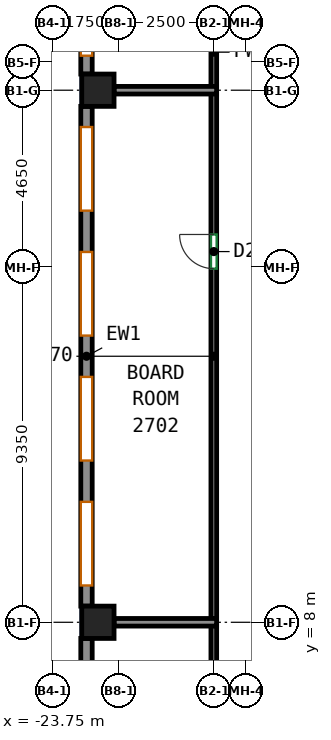
"""IFC4 building model, lengths in metres.
Left out: names, types, materials, properties, quantities, classifications, styles, units other than length and angle.
Written with IfcOpenShell. Run it as: python <this file> out.ifc"""

import sys

from ifc_helpers import new_model, si_unit, direction, frame, frame_2d, origin, origin_2d, place, context, subcontext, project, spatial, rectangle, extrude, source, transform, mapped, element, fill, save


model = new_model("IFC4")
c1 = context("Model", 3, precision=1e-05, world=origin(), true_north=direction((0.0, 1.0)))
c2 = subcontext(c1, "Body", "Model", "MODEL_VIEW")
j1 = project(units=[si_unit("LENGTHUNIT", "METRE"), si_unit("PLANEANGLEUNIT", "RADIAN")], contexts=[c1])
p1 = place(None, origin())
s1 = spatial("IfcSite", under=j1, at=p1, CompositionType="ELEMENT")
p2 = place(p1, origin())
s2 = spatial("IfcBuilding", under=s1, at=p2, CompositionType="ELEMENT")
p3 = place(p2, frame((0.0, 0.0, 116.6)))
s3 = spatial("IfcBuildingStorey", under=s2, at=p3, CompositionType="ELEMENT", Elevation=116.6)
m1 = source(origin(), c2, "Body", "SweptSolid", [
    extrude(rectangle(XDim=0.85, YDim=0.85, at=origin_2d()), origin(), (0.0, 0.0, 1.0), 3.72),
])
for number, where, z_axis, x_axis in (
    (1, (-22.55, 8.0, 0.0), (0.0, 0.0, 1.0), (1.0, 0.0, 0.0)),
    (2, (-22.55, 22.0, 0.0), (0.0, 0.0, 1.0), (1.0, 0.0, 0.0)),
):
    element("IfcColumn", number, at=place(p3, frame(where, z_axis=z_axis, x_axis=x_axis)), inside=s3, PredefinedType="COLUMN", context=c2, shape_type="MappedRepresentation", body=[
        mapped(m1, transform((0.0, 0.0, 0.0))),
    ])
m2 = source(origin(), c2, "Body", "SweptSolid", [
    extrude(rectangle(XDim=6.332, YDim=0.3, at=frame_2d((3.166, 0.0))), origin(), (0.0, 0.0, 1.0), 3.72),
])
p4 = place(p3, frame((-22.85, 28.757, 0.0), z_axis=(0.0, 0.0, 1.0), x_axis=(0.0, -1.0, 0.0)))
e3 = element("IfcWall", 3, at=p4, inside=s3, PredefinedType="SOLIDWALL", context=c2, shape_type="MappedRepresentation", body=[
    mapped(m2, transform((0.0, 0.0, 0.0))),
])
p5 = place(p4, frame((0.483, 0.0, 0.7)))
e4 = element("IfcOpeningElement", 4, at=p5, cuts=e3, PredefinedType="OPENING", context=c2, shape_type="SweptSolid", body=[
    extrude(rectangle(XDim=2.2, YDim=2.25, at=frame_2d((1.1, 1.125))), frame((0.0, 0.16, 0.0), z_axis=(0.0, -1.0, 0.0), x_axis=(1.0, 0.0, 0.0)), (0.0, 0.0, 1.0), 0.32),
])
p6 = place(p4, frame((3.649, 0.0, 0.7)))
e5 = element("IfcOpeningElement", 5, at=p6, cuts=e3, PredefinedType="OPENING", context=c2, shape_type="SweptSolid", body=[
    extrude(rectangle(XDim=2.2, YDim=2.25, at=frame_2d((1.1, 1.125))), frame((0.0, 0.16, 0.0), z_axis=(0.0, -1.0, 0.0), x_axis=(1.0, 0.0, 0.0)), (0.0, 0.0, 1.0), 0.32),
])
m3 = source(origin(), c2, "Body", "SweptSolid", [
    extrude(rectangle(XDim=13.15, YDim=0.3, at=frame_2d((6.575, 0.0))), origin(), (0.0, 0.0, 1.0), 3.72),
])
p7 = place(p3, frame((-22.85, 21.575, 0.0), z_axis=(0.0, 0.0, 1.0), x_axis=(0.0, -1.0, 0.0)))
e6 = element("IfcWall", 6, at=p7, inside=s3, PredefinedType="SOLIDWALL", context=c2, shape_type="MappedRepresentation", body=[
    mapped(m3, transform((0.0, 0.0, 0.0))),
])
p8 = place(p7, frame((0.544, 0.0, 0.7)))
e7 = element("IfcOpeningElement", 7, at=p8, cuts=e6, PredefinedType="OPENING", context=c2, shape_type="SweptSolid", body=[
    extrude(rectangle(XDim=2.2, YDim=2.25, at=frame_2d((1.1, 1.125))), frame((0.0, 0.16, 0.0), z_axis=(0.0, -1.0, 0.0), x_axis=(1.0, 0.0, 0.0)), (0.0, 0.0, 1.0), 0.32),
])
p9 = place(p7, frame((3.831, 0.0, 0.7)))
e8 = element("IfcOpeningElement", 8, at=p9, cuts=e6, PredefinedType="OPENING", context=c2, shape_type="SweptSolid", body=[
    extrude(rectangle(XDim=2.2, YDim=2.25, at=frame_2d((1.1, 1.125))), frame((0.0, 0.16, 0.0), z_axis=(0.0, -1.0, 0.0), x_axis=(1.0, 0.0, 0.0)), (0.0, 0.0, 1.0), 0.32),
])
p10 = place(p7, frame((7.119, 0.0, 0.7)))
e9 = element("IfcOpeningElement", 9, at=p10, cuts=e6, PredefinedType="OPENING", context=c2, shape_type="SweptSolid", body=[
    extrude(rectangle(XDim=2.2, YDim=2.25, at=frame_2d((1.1, 1.125))), frame((0.0, 0.16, 0.0), z_axis=(0.0, -1.0, 0.0), x_axis=(1.0, 0.0, 0.0)), (0.0, 0.0, 1.0), 0.32),
])
p11 = place(p7, frame((10.406, 0.0, 0.7)))
e10 = element("IfcOpeningElement", 10, at=p11, cuts=e6, PredefinedType="OPENING", context=c2, shape_type="SweptSolid", body=[
    extrude(rectangle(XDim=2.2, YDim=2.25, at=frame_2d((1.1, 1.125))), frame((0.0, 0.16, 0.0), z_axis=(0.0, -1.0, 0.0), x_axis=(1.0, 0.0, 0.0)), (0.0, 0.0, 1.0), 0.32),
])
m4 = source(origin(), c2, "Body", "SweptSolid", [
    extrude(rectangle(XDim=6.9, YDim=0.3, at=frame_2d((3.45, 0.0))), origin(), (0.0, 0.0, 1.0), 3.72),
])
p12 = place(p3, frame((-22.85, 7.575, 0.0), z_axis=(0.0, 0.0, 1.0), x_axis=(0.0, -1.0, 0.0)))
e11 = element("IfcWall", 11, at=p12, inside=s3, PredefinedType="SOLIDWALL", context=c2, shape_type="MappedRepresentation", body=[
    mapped(m4, transform((0.0, 0.0, 0.0))),
])
p13 = place(p12, frame((0.625, 0.0, 0.7)))
e12 = element("IfcOpeningElement", 12, at=p13, cuts=e11, PredefinedType="OPENING", context=c2, shape_type="SweptSolid", body=[
    extrude(rectangle(XDim=2.2, YDim=2.25, at=frame_2d((1.1, 1.125))), frame((0.0, 0.16, 0.0), z_axis=(0.0, -1.0, 0.0), x_axis=(1.0, 0.0, 0.0)), (0.0, 0.0, 1.0), 0.32),
])
p14 = place(p12, frame((4.075, 0.0, 0.7)))
e13 = element("IfcOpeningElement", 13, at=p14, cuts=e11, PredefinedType="OPENING", context=c2, shape_type="SweptSolid", body=[
    extrude(rectangle(XDim=2.2, YDim=2.25, at=frame_2d((1.1, 1.125))), frame((0.0, 0.16, 0.0), z_axis=(0.0, -1.0, 0.0), x_axis=(1.0, 0.0, 0.0)), (0.0, 0.0, 1.0), 0.32),
])
p15 = place(p3, frame((-19.5, 4.35, 0.0), z_axis=(0.0, 0.0, 1.0), x_axis=(0.0, 1.0, 0.0)))
e14 = element("IfcWall", 14, at=p15, inside=s3, PredefinedType="PARTITIONING", context=c2, shape_type="SweptSolid", body=[
    extrude(rectangle(XDim=3.56, YDim=0.15, at=frame_2d((1.78, 0.0))), origin(), (0.0, 0.0, 1.0), 3.07),
])
p16 = place(p3, frame((-19.5, 22.09, 0.0), z_axis=(0.0, 0.0, 1.0), x_axis=(0.0, 1.0, 0.0)))
e15 = element("IfcWall", 15, at=p16, inside=s3, PredefinedType="PARTITIONING", context=c2, shape_type="SweptSolid", body=[
    extrude(rectangle(XDim=3.035, YDim=0.15, at=frame_2d((1.518, 0.0))), origin(), (0.0, 0.0, 1.0), 3.07),
])
p17 = place(p16, frame((1.631, 0.0, 0.0)))
e16 = element("IfcOpeningElement", 16, at=p17, cuts=e15, PredefinedType="OPENING", context=c2, shape_type="SweptSolid", body=[
    extrude(rectangle(XDim=1.0, YDim=2.1, at=frame_2d((0.5, 1.05))), frame((0.0, 0.085, 0.0), z_axis=(0.0, -1.0, 0.0), x_axis=(1.0, 0.0, 0.0)), (0.0, 0.0, 1.0), 0.17),
])
p18 = place(p3, frame((-19.5, 8.09, 0.0), z_axis=(0.0, 0.0, 1.0), x_axis=(0.0, 1.0, 0.0)))
e17 = element("IfcWall", 17, at=p18, inside=s3, PredefinedType="PARTITIONING", context=c2, shape_type="SweptSolid", body=[
    extrude(rectangle(XDim=13.82, YDim=0.15, at=frame_2d((6.91, 0.0))), origin(), (0.0, 0.0, 1.0), 3.07),
])
p19 = place(p18, frame((9.214, 0.0, 0.0)))
e18 = element("IfcOpeningElement", 18, at=p19, cuts=e17, PredefinedType="OPENING", context=c2, shape_type="SweptSolid", body=[
    extrude(rectangle(XDim=0.9, YDim=2.1, at=frame_2d((0.45, 1.05))), frame((0.0, 0.085, 0.0), z_axis=(0.0, -1.0, 0.0), x_axis=(1.0, 0.0, 0.0)), (0.0, 0.0, 1.0), 0.17),
])
for number, where, z_axis, x_axis in (
    (19, (-22.125, 8.0, 0.0), (0.0, 0.0, 1.0), (1.0, 0.0, 0.0)),
    (20, (-22.125, 22.0, 0.0), (0.0, 0.0, 1.0), (1.0, 0.0, 0.0)),
):
    element("IfcWall", number, at=place(p3, frame(where, z_axis=z_axis, x_axis=x_axis)), inside=s3, PredefinedType="PARTITIONING", context=c2, shape_type="SweptSolid", body=[
        extrude(rectangle(XDim=2.699, YDim=0.2, at=frame_2d((1.35, 0.0))), origin(), (0.0, 0.0, 1.0), 3.72),
    ])
p20 = place(p6, origin())
e21 = element("IfcWindow", 21, at=p20, inside=s3, PartitioningType="SINGLE_PANEL", PredefinedType="WINDOW", context=c2, shape_type="SweptSolid", body=[
    extrude(rectangle(XDim=2.2, YDim=2.25, at=frame_2d((1.1, 1.125))), frame((0.0, 0.03, 0.0), z_axis=(0.0, -1.0, 0.0), x_axis=(1.0, 0.0, 0.0)), (0.0, 0.0, 1.0), 0.06),
])
fill(e5, e21)
p21 = place(p8, origin())
e22 = element("IfcWindow", 22, at=p21, inside=s3, PartitioningType="SINGLE_PANEL", PredefinedType="WINDOW", context=c2, shape_type="SweptSolid", body=[
    extrude(rectangle(XDim=2.2, YDim=2.25, at=frame_2d((1.1, 1.125))), frame((0.0, 0.03, 0.0), z_axis=(0.0, -1.0, 0.0), x_axis=(1.0, 0.0, 0.0)), (0.0, 0.0, 1.0), 0.06),
])
fill(e7, e22)
p22 = place(p9, origin())
e23 = element("IfcWindow", 23, at=p22, inside=s3, PartitioningType="SINGLE_PANEL", PredefinedType="WINDOW", context=c2, shape_type="SweptSolid", body=[
    extrude(rectangle(XDim=2.2, YDim=2.25, at=frame_2d((1.1, 1.125))), frame((0.0, 0.03, 0.0), z_axis=(0.0, -1.0, 0.0), x_axis=(1.0, 0.0, 0.0)), (0.0, 0.0, 1.0), 0.06),
])
fill(e8, e23)
p23 = place(p10, origin())
e24 = element("IfcWindow", 24, at=p23, inside=s3, PartitioningType="SINGLE_PANEL", PredefinedType="WINDOW", context=c2, shape_type="SweptSolid", body=[
    extrude(rectangle(XDim=2.2, YDim=2.25, at=frame_2d((1.1, 1.125))), frame((0.0, 0.03, 0.0), z_axis=(0.0, -1.0, 0.0), x_axis=(1.0, 0.0, 0.0)), (0.0, 0.0, 1.0), 0.06),
])
fill(e9, e24)
p24 = place(p11, origin())
e25 = element("IfcWindow", 25, at=p24, inside=s3, PartitioningType="SINGLE_PANEL", PredefinedType="WINDOW", context=c2, shape_type="SweptSolid", body=[
    extrude(rectangle(XDim=2.2, YDim=2.25, at=frame_2d((1.1, 1.125))), frame((0.0, 0.03, 0.0), z_axis=(0.0, -1.0, 0.0), x_axis=(1.0, 0.0, 0.0)), (0.0, 0.0, 1.0), 0.06),
])
fill(e10, e25)
p25 = place(p19, origin())
e26 = element("IfcDoor", 26, at=p25, inside=s3, OperationType="SINGLE_SWING_RIGHT", PredefinedType="DOOR", context=c2, shape_type="SweptSolid", body=[
    extrude(rectangle(XDim=0.9, YDim=2.1, at=frame_2d((0.45, 1.05))), frame((0.0, 0.025, 0.0), z_axis=(0.0, -1.0, 0.0), x_axis=(1.0, 0.0, 0.0)), (0.0, 0.0, 1.0), 0.05),
])
fill(e18, e26)
save(model, sys.argv[1])
